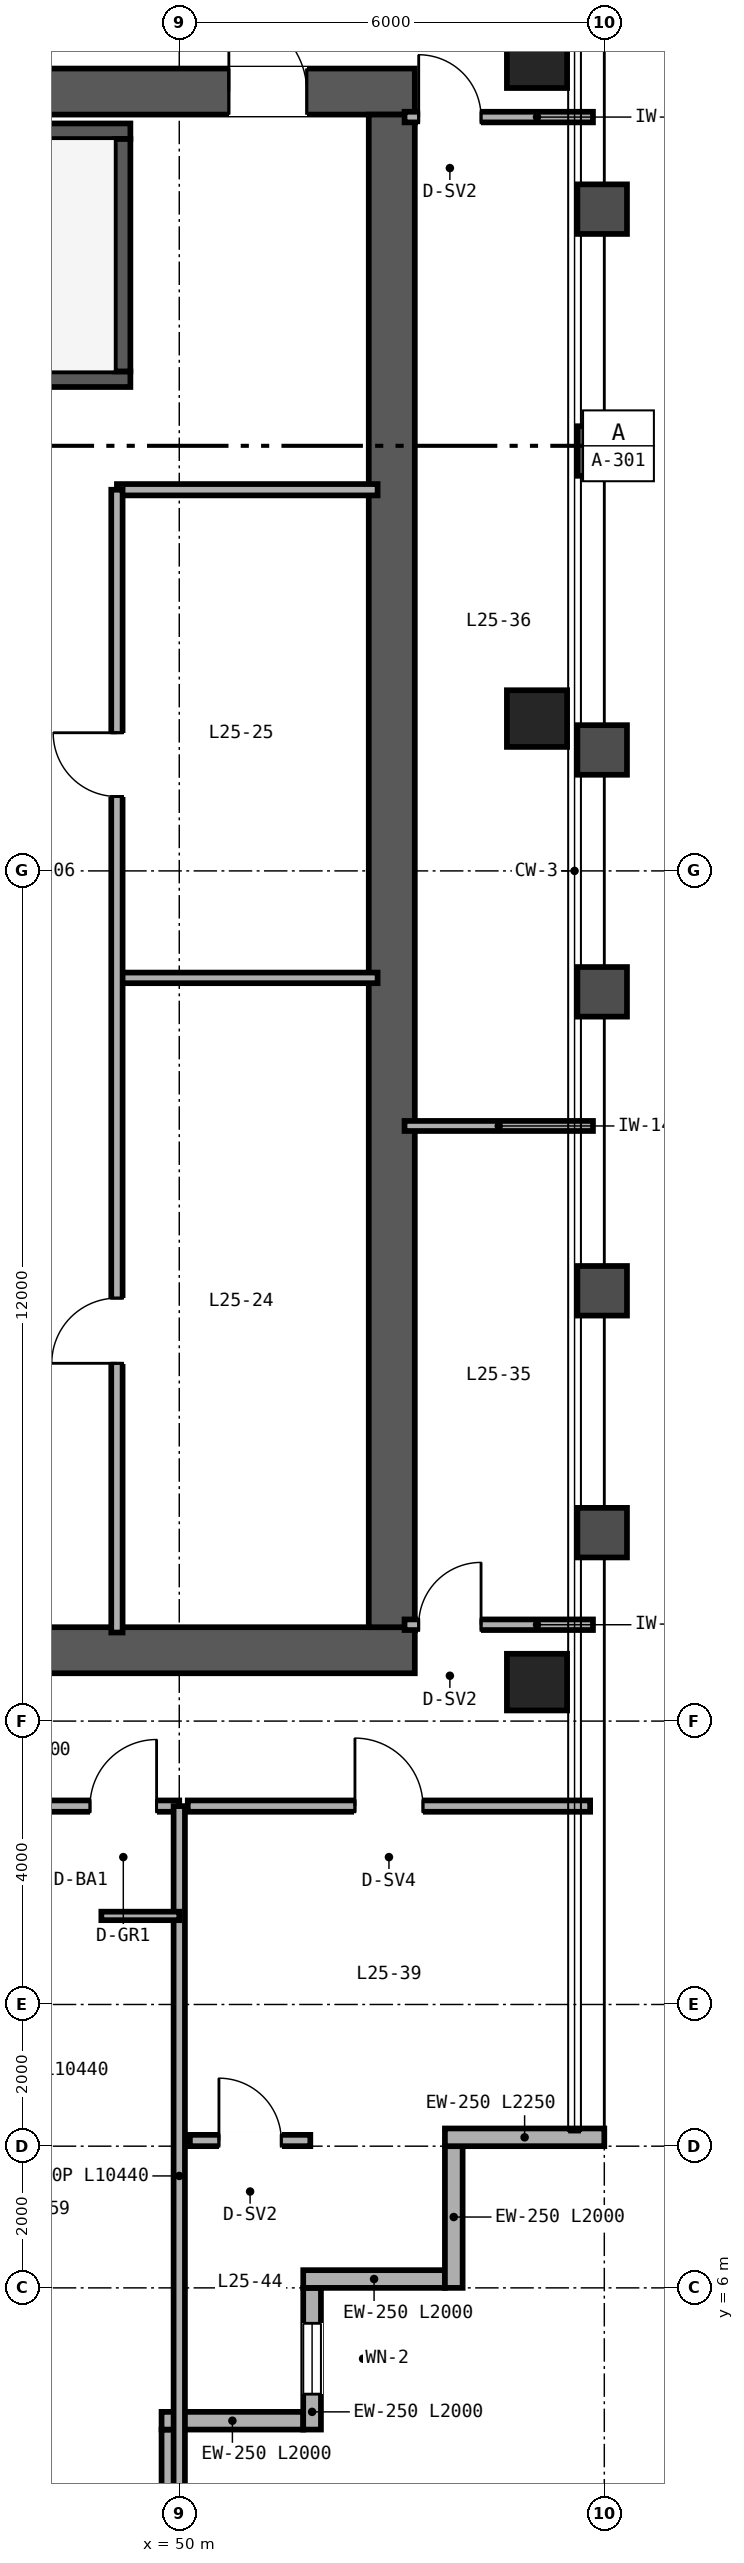
"""IFC4 building model, lengths in metres.
Left out: names, types, materials, properties, quantities, classifications, styles, units other than length and angle.
Written with IfcOpenShell. Run it as: python <this file> out.ifc"""

import sys

from ifc_helpers import new_model, si_unit, direction, frame, frame_2d, origin, origin_2d, place, context, subcontext, project, spatial, rectangle, hollow_rectangle, extrude, source, transform, mapped, element, fill, save


model = new_model("IFC4")
c1 = context("Model", 3, precision=1e-05, world=origin(), true_north=direction((0.0, 1.0)))
c2 = subcontext(c1, "Body", "Model", "MODEL_VIEW")
j1 = project(units=[si_unit("LENGTHUNIT", "METRE"), si_unit("PLANEANGLEUNIT", "RADIAN")], contexts=[c1])
p1 = place(None, origin())
s1 = spatial("IfcSite", under=j1, at=p1, CompositionType="ELEMENT")
p2 = place(p1, origin())
s2 = spatial("IfcBuilding", under=s1, at=p2, CompositionType="ELEMENT")
p3 = place(p2, frame((0.0, 0.0, 104.4)))
s3 = spatial("IfcBuildingStorey", under=s2, at=p3, CompositionType="ELEMENT", Elevation=104.4)
p4 = place(p3, frame((40.675, 15.0, 0.0), z_axis=(0.0, 0.0, 1.0), x_axis=(1.0, 0.0, 0.0)))
e1 = element("IfcWall", 1, at=p4, inside=s3, PredefinedType="SHEAR", context=c2, shape_type="SweptSolid", body=[
    extrude(rectangle(XDim=12.65, YDim=0.65, at=frame_2d((6.325, 0.0))), origin(), (0.0, 0.0, 1.0), 3.36),
])
p5 = place(p4, frame((4.425, 0.0, 0.0)))
e2 = element("IfcOpeningElement", 2, at=p5, cuts=e1, PredefinedType="OPENING", context=c2, shape_type="SweptSolid", body=[
    extrude(rectangle(XDim=1.0, YDim=2.15, at=frame_2d((0.5, 1.075))), frame((0.0, 0.335, 0.0), z_axis=(0.0, -1.0, 0.0), x_axis=(1.0, 0.0, 0.0)), (0.0, 0.0, 1.0), 0.67),
])
p6 = place(p3, frame((40.675, 37.0, 0.0), z_axis=(0.0, 0.0, 1.0), x_axis=(1.0, 0.0, 0.0)))
e3 = element("IfcWall", 3, at=p6, inside=s3, PredefinedType="SHEAR", context=c2, shape_type="SweptSolid", body=[
    extrude(rectangle(XDim=12.65, YDim=0.65, at=frame_2d((6.325, 0.0))), origin(), (0.0, 0.0, 1.0), 3.36),
])
p7 = place(p6, frame((10.025, 0.0, 0.0)))
e4 = element("IfcOpeningElement", 4, at=p7, cuts=e3, PredefinedType="OPENING", context=c2, shape_type="SweptSolid", body=[
    extrude(rectangle(XDim=1.1, YDim=2.15, at=frame_2d((0.55, 1.075))), frame((0.0, 0.335, 0.0), z_axis=(0.0, -1.0, 0.0), x_axis=(1.0, 0.0, 0.0)), (0.0, 0.0, 1.0), 0.67),
])
p8 = place(p3, frame((53.0, 15.325, 0.0), z_axis=(0.0, 0.0, 1.0), x_axis=(0.0, 1.0, 0.0)))
e5 = element("IfcWall", 5, at=p8, inside=s3, PredefinedType="SHEAR", context=c2, shape_type="SweptSolid", body=[
    extrude(rectangle(XDim=21.35, YDim=0.65, at=frame_2d((10.675, 0.0))), origin(), (0.0, 0.0, 1.0), 3.36),
])
p9 = place(p3, frame((41.325, 32.94, 0.0), z_axis=(0.0, 0.0, 1.0), x_axis=(1.0, 0.0, 0.0)))
e6 = element("IfcWall", 6, at=p9, inside=s3, PredefinedType="SHEAR", context=c2, shape_type="SweptSolid", body=[
    extrude(rectangle(XDim=7.985, YDim=0.22, at=frame_2d((3.993, 0.0))), origin(), (0.0, 0.0, 1.0), 3.4),
])
p10 = place(p9, frame((0.595, 0.0, 0.0)))
e7 = element("IfcOpeningElement", 7, at=p10, cuts=e6, PredefinedType="OPENING", context=c2, shape_type="SweptSolid", body=[
    extrude(rectangle(XDim=1.05, YDim=2.15, at=frame_2d((0.525, 1.075))), frame((0.0, 0.12, 0.0), z_axis=(0.0, -1.0, 0.0), x_axis=(1.0, 0.0, 0.0)), (0.0, 0.0, 1.0), 0.24),
])
p11 = place(p3, frame((41.325, 36.44, 0.0), z_axis=(0.0, 0.0, 1.0), x_axis=(1.0, 0.0, 0.0)))
e8 = element("IfcWall", 8, at=p11, inside=s3, PredefinedType="SHEAR", context=c2, shape_type="SweptSolid", body=[
    extrude(rectangle(XDim=7.985, YDim=0.22, at=frame_2d((3.993, 0.0))), origin(), (0.0, 0.0, 1.0), 3.4),
])
p12 = place(p3, frame((49.2, 33.05, 0.0), z_axis=(0.0, 0.0, 1.0), x_axis=(0.0, 1.0, 0.0)))
e9 = element("IfcWall", 9, at=p12, inside=s3, PredefinedType="SHEAR", context=c2, shape_type="SweptSolid", body=[
    extrude(rectangle(XDim=3.28, YDim=0.22, at=frame_2d((1.64, 0.0))), origin(), (0.0, 0.0, 1.0), 3.4),
])
m1 = source(origin(), c2, "Body", "SweptSolid", [
    extrude(hollow_rectangle(XDim=0.85, YDim=0.8, WallThickness=0.032, at=origin_2d()), origin(), (0.0, 0.0, 1.0), 3.36),
])
for number, where, z_axis, x_axis in (
    (10, (55.05, 14.55, 0.0), (0.0, 0.0, 1.0), (1.0, 0.0, 0.0)),
    (11, (55.05, 28.15, 0.0), (0.0, 0.0, 1.0), (1.0, 0.0, 0.0)),
    (12, (55.05, 37.45, 0.0), (0.0, 0.0, 1.0), (1.0, 0.0, 0.0)),
):
    element("IfcColumn", number, at=place(p3, frame(where, z_axis=z_axis, x_axis=x_axis)), inside=s3, PredefinedType="COLUMN", context=c2, shape_type="MappedRepresentation", body=[
        mapped(m1, transform((0.0, 0.0, 0.0), scale=1.0)),
    ])
p13 = place(p3, frame((49.875, 2.0, 0.0), z_axis=(0.0, 0.0, 1.0), x_axis=(0.0, 1.0, 0.0)))
e13 = element("IfcWall", 13, at=p13, inside=s3, PredefinedType="SOLIDWALL", context=c2, shape_type="SweptSolid", body=[
    extrude(rectangle(XDim=2.0, YDim=0.25, at=frame_2d((1.0, 0.0))), origin(), (0.0, 0.0, 1.0), 2.667),
])
p14 = place(p3, frame((49.75, 4.125, 0.0), z_axis=(0.0, 0.0, 1.0), x_axis=(1.0, 0.0, 0.0)))
e14 = element("IfcWall", 14, at=p14, inside=s3, PredefinedType="SOLIDWALL", context=c2, shape_type="SweptSolid", body=[
    extrude(rectangle(XDim=2.0, YDim=0.25, at=frame_2d((1.0, 0.0))), origin(), (0.0, 0.0, 1.0), 3.36),
])
p15 = place(p3, frame((51.875, 4.0, 0.0), z_axis=(0.0, 0.0, 1.0), x_axis=(0.0, 1.0, 0.0)))
e15 = element("IfcWall", 15, at=p15, inside=s3, PredefinedType="SOLIDWALL", context=c2, shape_type="SweptSolid", body=[
    extrude(rectangle(XDim=2.0, YDim=0.25, at=frame_2d((1.0, 0.0))), origin(), (0.0, 0.0, 1.0), 3.36),
])
p16 = place(p15, frame((0.5, 0.0, 0.85)))
e16 = element("IfcOpeningElement", 16, at=p16, cuts=e15, PredefinedType="OPENING", context=c2, shape_type="SweptSolid", body=[
    extrude(rectangle(XDim=1.0, YDim=1.9, at=frame_2d((0.5, 0.95))), frame((0.0, 0.135, 0.0), z_axis=(0.0, -1.0, 0.0), x_axis=(1.0, 0.0, 0.0)), (0.0, 0.0, 1.0), 0.27),
])
for number, where, z_axis, x_axis in (
    (17, (51.75, 6.125, 0.0), (0.0, 0.0, 1.0), (1.0, 0.0, 0.0)),
    (18, (53.875, 6.0, 0.0), (0.0, 0.0, 1.0), (0.0, 1.0, 0.0)),
):
    element("IfcWall", number, at=place(p3, frame(where, z_axis=z_axis, x_axis=x_axis)), inside=s3, PredefinedType="SOLIDWALL", context=c2, shape_type="SweptSolid", body=[
        extrude(rectangle(XDim=2.0, YDim=0.25, at=frame_2d((1.0, 0.0))), origin(), (0.0, 0.0, 1.0), 3.36),
    ])
p17 = place(p3, frame((53.75, 8.125, 0.0), z_axis=(0.0, 0.0, 1.0), x_axis=(1.0, 0.0, 0.0)))
e19 = element("IfcWall", 19, at=p17, inside=s3, PredefinedType="SOLIDWALL", context=c2, shape_type="SweptSolid", body=[
    extrude(rectangle(XDim=2.25, YDim=0.25, at=frame_2d((1.125, 0.0))), origin(), (0.0, 0.0, 1.0), 3.36),
])
p18 = place(p3, frame((49.12, 31.38, 0.0), z_axis=(0.0, 0.0, 1.0), x_axis=(1.0, 0.0, 0.0)))
e20 = element("IfcWall", 20, at=p18, inside=s3, PredefinedType="PARTITIONING", context=c2, shape_type="SweptSolid", body=[
    extrude(rectangle(XDim=3.68, YDim=0.16, at=frame_2d((1.84, 0.0))), origin(), (0.0, 0.0, 1.0), 2.36),
])
p19 = place(p3, frame((49.12, 24.49, 0.0), z_axis=(0.0, 0.0, 1.0), x_axis=(1.0, 0.0, 0.0)))
e21 = element("IfcWall", 21, at=p19, inside=s3, PredefinedType="PARTITIONING", context=c2, shape_type="SweptSolid", body=[
    extrude(rectangle(XDim=3.68, YDim=0.15, at=frame_2d((1.84, 0.0))), origin(), (0.0, 0.0, 1.0), 3.36),
])
p20 = place(p3, frame((49.12, 15.25, 0.0), z_axis=(0.0, 0.0, 1.0), x_axis=(0.0, 1.0, 0.0)))
e22 = element("IfcWall", 22, at=p20, inside=s3, PredefinedType="PARTITIONING", context=c2, shape_type="SweptSolid", body=[
    extrude(rectangle(XDim=16.13, YDim=0.16, at=frame_2d((8.065, 0.0))), origin(), (0.0, 0.0, 1.0), 2.36),
])
p21 = place(p20, frame((3.8, 0.0, 0.0)))
e23 = element("IfcOpeningElement", 23, at=p21, cuts=e22, PredefinedType="OPENING", context=c2, shape_type="SweptSolid", body=[
    extrude(rectangle(XDim=0.92, YDim=2.15, at=frame_2d((0.46, 1.075))), frame((0.0, 0.09, 0.0), z_axis=(0.0, -1.0, 0.0), x_axis=(1.0, 0.0, 0.0)), (0.0, 0.0, 1.0), 0.18),
])
p22 = place(p20, frame((11.8, 0.0, 0.0)))
e24 = element("IfcOpeningElement", 24, at=p22, cuts=e22, PredefinedType="OPENING", context=c2, shape_type="SweptSolid", body=[
    extrude(rectangle(XDim=0.9, YDim=2.15, at=frame_2d((0.45, 1.075))), frame((0.0, 0.09, 0.0), z_axis=(0.0, -1.0, 0.0), x_axis=(1.0, 0.0, 0.0)), (0.0, 0.0, 1.0), 0.18),
])
p23 = place(p3, frame((53.18, 15.36, 0.0), z_axis=(0.0, 0.0, 1.0), x_axis=(1.0, 0.0, 0.0)))
e25 = element("IfcWall", 25, at=p23, inside=s3, PredefinedType="PARTITIONING", context=c2, shape_type="SweptSolid", body=[
    extrude(rectangle(XDim=2.66, YDim=0.15, at=frame_2d((1.33, 0.0))), origin(), (0.0, 0.0, 1.0), 2.581),
])
p24 = place(p23, frame((0.2, 0.0, 0.0)))
e26 = element("IfcOpeningElement", 26, at=p24, cuts=e25, PredefinedType="OPENING", context=c2, shape_type="SweptSolid", body=[
    extrude(rectangle(XDim=0.88, YDim=2.15, at=frame_2d((0.44, 1.075))), frame((0.0, 0.085, 0.0), z_axis=(0.0, -1.0, 0.0), x_axis=(1.0, 0.0, 0.0)), (0.0, 0.0, 1.0), 0.17),
])
p25 = place(p3, frame((53.18, 36.64, 0.0), z_axis=(0.0, 0.0, 1.0), x_axis=(1.0, 0.0, 0.0)))
e27 = element("IfcWall", 27, at=p25, inside=s3, PredefinedType="PARTITIONING", context=c2, shape_type="SweptSolid", body=[
    extrude(rectangle(XDim=2.66, YDim=0.15, at=frame_2d((1.33, 0.0))), origin(), (0.0, 0.0, 1.0), 2.743),
])
p26 = place(p25, frame((0.2, 0.0, 0.0)))
e28 = element("IfcOpeningElement", 28, at=p26, cuts=e27, PredefinedType="OPENING", context=c2, shape_type="SweptSolid", body=[
    extrude(rectangle(XDim=0.88, YDim=2.15, at=frame_2d((0.44, 1.075))), frame((0.0, 0.085, 0.0), z_axis=(0.0, -1.0, 0.0), x_axis=(1.0, 0.0, 0.0)), (0.0, 0.0, 1.0), 0.17),
])
p27 = place(p3, frame((53.18, 22.4, 0.0), z_axis=(0.0, 0.0, 1.0), x_axis=(1.0, 0.0, 0.0)))
e29 = element("IfcWall", 29, at=p27, inside=s3, PredefinedType="PARTITIONING", context=c2, shape_type="SweptSolid", body=[
    extrude(rectangle(XDim=2.66, YDim=0.142, at=frame_2d((1.33, 0.0))), origin(), (0.0, 0.0, 1.0), 2.581),
])
p28 = place(p3, frame((50.12, 12.8, 0.0), z_axis=(0.0, 0.0, 1.0), x_axis=(1.0, 0.0, 0.0)))
e30 = element("IfcWall", 30, at=p28, inside=s3, PredefinedType="PARTITIONING", context=c2, shape_type="SweptSolid", body=[
    extrude(rectangle(XDim=5.68, YDim=0.16, at=frame_2d((2.84, 0.0))), origin(), (0.0, 0.0, 1.0), 3.36),
])
p29 = place(p28, frame((2.36, 0.0, 0.0)))
e31 = element("IfcOpeningElement", 31, at=p29, cuts=e30, PredefinedType="OPENING", context=c2, shape_type="SweptSolid", body=[
    extrude(rectangle(XDim=0.96, YDim=2.15, at=frame_2d((0.48, 1.075))), frame((0.0, 0.09, 0.0), z_axis=(0.0, -1.0, 0.0), x_axis=(1.0, 0.0, 0.0)), (0.0, 0.0, 1.0), 0.18),
])
p30 = place(p3, frame((50.15, 8.08, 0.0), z_axis=(0.0, 0.0, 1.0), x_axis=(1.0, 0.0, 0.0)))
e32 = element("IfcWall", 32, at=p30, inside=s3, PredefinedType="PARTITIONING", context=c2, shape_type="SweptSolid", body=[
    extrude(rectangle(XDim=1.7, YDim=0.16, at=frame_2d((0.85, 0.0))), origin(), (0.0, 0.0, 1.0), 3.36),
])
p31 = place(p30, frame((0.41, 0.0, 0.0)))
e33 = element("IfcOpeningElement", 33, at=p31, cuts=e32, PredefinedType="OPENING", context=c2, shape_type="SweptSolid", body=[
    extrude(rectangle(XDim=0.88, YDim=2.15, at=frame_2d((0.44, 1.075))), frame((0.0, 0.09, 0.0), z_axis=(0.0, -1.0, 0.0), x_axis=(1.0, 0.0, 0.0)), (0.0, 0.0, 1.0), 0.18),
])
p32 = place(p3, frame((14.0, 12.8, 0.0), z_axis=(0.0, 0.0, 1.0), x_axis=(1.0, 0.0, 0.0)))
e34 = element("IfcWall", 34, at=p32, inside=s3, PredefinedType="PARTITIONING", context=c2, shape_type="SweptSolid", body=[
    extrude(rectangle(XDim=36.0, YDim=0.16, at=frame_2d((18.0, 0.0))), origin(), (0.0, 0.0, 1.0), 2.581),
])
p33 = place(p32, frame((3.14, 0.0, 0.0)))
e35 = element("IfcOpeningElement", 35, at=p33, cuts=e34, PredefinedType="OPENING", context=c2, shape_type="SweptSolid", body=[
    extrude(rectangle(XDim=0.94, YDim=2.15, at=frame_2d((0.47, 1.075))), frame((0.0, 0.09, 0.0), z_axis=(0.0, -1.0, 0.0), x_axis=(1.0, 0.0, 0.0)), (0.0, 0.0, 1.0), 0.18),
])
p34 = place(p32, frame((7.54, 0.0, 0.0)))
e36 = element("IfcOpeningElement", 36, at=p34, cuts=e34, PredefinedType="OPENING", context=c2, shape_type="SweptSolid", body=[
    extrude(rectangle(XDim=0.94, YDim=2.15, at=frame_2d((0.47, 1.075))), frame((0.0, 0.09, 0.0), z_axis=(0.0, -1.0, 0.0), x_axis=(1.0, 0.0, 0.0)), (0.0, 0.0, 1.0), 0.18),
])
p35 = place(p32, frame((12.14, 0.0, 0.0)))
e37 = element("IfcOpeningElement", 37, at=p35, cuts=e34, PredefinedType="OPENING", context=c2, shape_type="SweptSolid", body=[
    extrude(rectangle(XDim=0.94, YDim=2.15, at=frame_2d((0.47, 1.075))), frame((0.0, 0.09, 0.0), z_axis=(0.0, -1.0, 0.0), x_axis=(1.0, 0.0, 0.0)), (0.0, 0.0, 1.0), 0.18),
])
p36 = place(p32, frame((16.94, 0.0, 0.0)))
e38 = element("IfcOpeningElement", 38, at=p36, cuts=e34, PredefinedType="OPENING", context=c2, shape_type="SweptSolid", body=[
    extrude(rectangle(XDim=0.94, YDim=2.15, at=frame_2d((0.47, 1.075))), frame((0.0, 0.09, 0.0), z_axis=(0.0, -1.0, 0.0), x_axis=(1.0, 0.0, 0.0)), (0.0, 0.0, 1.0), 0.18),
])
p37 = place(p32, frame((21.74, 0.0, 0.0)))
e39 = element("IfcOpeningElement", 39, at=p37, cuts=e34, PredefinedType="OPENING", context=c2, shape_type="SweptSolid", body=[
    extrude(rectangle(XDim=0.94, YDim=2.15, at=frame_2d((0.47, 1.075))), frame((0.0, 0.09, 0.0), z_axis=(0.0, -1.0, 0.0), x_axis=(1.0, 0.0, 0.0)), (0.0, 0.0, 1.0), 0.18),
])
p38 = place(p32, frame((26.34, 0.0, 0.0)))
e40 = element("IfcOpeningElement", 40, at=p38, cuts=e34, PredefinedType="OPENING", context=c2, shape_type="SweptSolid", body=[
    extrude(rectangle(XDim=0.94, YDim=2.15, at=frame_2d((0.47, 1.075))), frame((0.0, 0.09, 0.0), z_axis=(0.0, -1.0, 0.0), x_axis=(1.0, 0.0, 0.0)), (0.0, 0.0, 1.0), 0.18),
])
p39 = place(p32, frame((30.54, 0.0, 0.0)))
e41 = element("IfcOpeningElement", 41, at=p39, cuts=e34, PredefinedType="OPENING", context=c2, shape_type="SweptSolid", body=[
    extrude(rectangle(XDim=0.94, YDim=2.15, at=frame_2d((0.47, 1.075))), frame((0.0, 0.09, 0.0), z_axis=(0.0, -1.0, 0.0), x_axis=(1.0, 0.0, 0.0)), (0.0, 0.0, 1.0), 0.18),
])
p40 = place(p32, frame((34.74, 0.0, 0.0)))
e42 = element("IfcOpeningElement", 42, at=p40, cuts=e34, PredefinedType="OPENING", context=c2, shape_type="SweptSolid", body=[
    extrude(rectangle(XDim=0.94, YDim=2.15, at=frame_2d((0.47, 1.075))), frame((0.0, 0.09, 0.0), z_axis=(0.0, -1.0, 0.0), x_axis=(1.0, 0.0, 0.0)), (0.0, 0.0, 1.0), 0.18),
])
p41 = place(p3, frame((50.0, 2.36, 0.0), z_axis=(0.0, 0.0, 1.0), x_axis=(0.0, 1.0, 0.0)))
e43 = element("IfcWall", 43, at=p41, inside=s3, PredefinedType="PARTITIONING", context=c2, shape_type="SweptSolid", body=[
    extrude(rectangle(XDim=10.44, YDim=0.16, at=frame_2d((5.22, 0.0))), origin(), (0.0, 0.0, 1.0), 2.667),
])
p42 = place(p3, frame((48.9, 11.25, 0.0), z_axis=(0.0, 0.0, 1.0), x_axis=(1.0, 0.0, 0.0)))
e44 = element("IfcWall", 44, at=p42, inside=s3, PredefinedType="PARTITIONING", context=c2, shape_type="SweptSolid", body=[
    extrude(rectangle(XDim=1.1, YDim=0.12, at=frame_2d((0.55, 0.0))), origin(), (0.0, 0.0, 1.0), 3.36),
])
m2 = source(origin(), c2, "Body", "SweptSolid", [
    extrude(rectangle(XDim=1.0, YDim=1.9, at=frame_2d((0.5, 0.95))), frame((0.0, 0.03, 0.0), z_axis=(0.0, -1.0, 0.0), x_axis=(1.0, 0.0, 0.0)), (0.0, 0.0, 1.0), 0.06),
])
p43 = place(p16, origin())
e45 = element("IfcWindow", 45, at=p43, inside=s3, PartitioningType="SINGLE_PANEL", PredefinedType="WINDOW", context=c2, shape_type="MappedRepresentation", body=[
    mapped(m2, transform((0.0, 0.0, 0.0), scale=1.0)),
])
fill(e16, e45)
m3 = source(origin(), c2, "Body", "SweptSolid", [
    extrude(rectangle(XDim=1.1, YDim=2.15, at=frame_2d((0.55, 1.075))), frame((0.0, 0.025, 0.0), z_axis=(0.0, -1.0, 0.0), x_axis=(1.0, 0.0, 0.0)), (0.0, 0.0, 1.0), 0.05),
])
p44 = place(p7, origin())
e46 = element("IfcDoor", 46, at=p44, inside=s3, OperationType="SINGLE_SWING_LEFT", PredefinedType="DOOR", context=c2, shape_type="MappedRepresentation", body=[
    mapped(m3, transform((0.0, 0.0, 0.0), scale=1.0)),
])
fill(e4, e46)
m4 = source(origin(), c2, "Body", "SweptSolid", [
    extrude(rectangle(XDim=0.92, YDim=2.15, at=frame_2d((0.46, 1.075))), frame((0.0, 0.025, 0.0), z_axis=(0.0, -1.0, 0.0), x_axis=(1.0, 0.0, 0.0)), (0.0, 0.0, 1.0), 0.05),
])
p45 = place(p21, origin())
e47 = element("IfcDoor", 47, at=p45, inside=s3, OperationType="SINGLE_SWING_LEFT", PredefinedType="DOOR", context=c2, shape_type="MappedRepresentation", body=[
    mapped(m4, transform((0.0, 0.0, 0.0), scale=1.0)),
])
fill(e23, e47)
m5 = source(origin(), c2, "Body", "SweptSolid", [
    extrude(rectangle(XDim=0.9, YDim=2.15, at=frame_2d((0.45, 1.075))), frame((0.0, 0.025, 0.0), z_axis=(0.0, -1.0, 0.0), x_axis=(1.0, 0.0, 0.0)), (0.0, 0.0, 1.0), 0.05),
])
p46 = place(p22, origin())
e48 = element("IfcDoor", 48, at=p46, inside=s3, OperationType="SINGLE_SWING_RIGHT", PredefinedType="DOOR", context=c2, shape_type="MappedRepresentation", body=[
    mapped(m5, transform((0.0, 0.0, 0.0), scale=1.0)),
])
fill(e24, e48)
m6 = source(origin(), c2, "Body", "SweptSolid", [
    extrude(rectangle(XDim=0.88, YDim=2.15, at=frame_2d((0.44, 1.075))), frame((0.0, 0.025, 0.0), z_axis=(0.0, -1.0, 0.0), x_axis=(1.0, 0.0, 0.0)), (0.0, 0.0, 1.0), 0.05),
])
p47 = place(p24, origin())
e49 = element("IfcDoor", 49, at=p47, inside=s3, OperationType="SINGLE_SWING_RIGHT", PredefinedType="DOOR", context=c2, shape_type="MappedRepresentation", body=[
    mapped(m6, transform((0.0, 0.0, 0.0), scale=1.0)),
])
fill(e26, e49)
p48 = place(p26, origin())
e50 = element("IfcDoor", 50, at=p48, inside=s3, OperationType="SINGLE_SWING_LEFT", PredefinedType="DOOR", context=c2, shape_type="MappedRepresentation", body=[
    mapped(m6, transform((0.0, 0.0, 0.0), scale=1.0)),
])
fill(e28, e50)
m7 = source(origin(), c2, "Body", "SweptSolid", [
    extrude(rectangle(XDim=0.96, YDim=2.15, at=frame_2d((0.48, 1.075))), frame((0.0, 0.025, 0.0), z_axis=(0.0, -1.0, 0.0), x_axis=(1.0, 0.0, 0.0)), (0.0, 0.0, 1.0), 0.05),
])
p49 = place(p29, origin())
e51 = element("IfcDoor", 51, at=p49, inside=s3, OperationType="SINGLE_SWING_LEFT", PredefinedType="DOOR", context=c2, shape_type="MappedRepresentation", body=[
    mapped(m7, transform((0.0, 0.0, 0.0), scale=1.0)),
])
fill(e31, e51)
p50 = place(p31, origin())
e52 = element("IfcDoor", 52, at=p50, inside=s3, OperationType="SINGLE_SWING_LEFT", PredefinedType="DOOR", context=c2, shape_type="MappedRepresentation", body=[
    mapped(m6, transform((0.0, 0.0, 0.0), scale=1.0)),
])
fill(e33, e52)
m8 = source(origin(), c2, "Body", "SweptSolid", [
    extrude(rectangle(XDim=0.94, YDim=2.15, at=frame_2d((0.47, 1.075))), frame((0.0, 0.025, 0.0), z_axis=(0.0, -1.0, 0.0), x_axis=(1.0, 0.0, 0.0)), (0.0, 0.0, 1.0), 0.05),
])
p51 = place(p40, origin())
e53 = element("IfcDoor", 53, at=p51, inside=s3, OperationType="SINGLE_SWING_RIGHT", PredefinedType="DOOR", context=c2, shape_type="MappedRepresentation", body=[
    mapped(m8, transform((0.0, 0.0, 0.0), scale=1.0)),
])
fill(e42, e53)
save(model, sys.argv[1])
